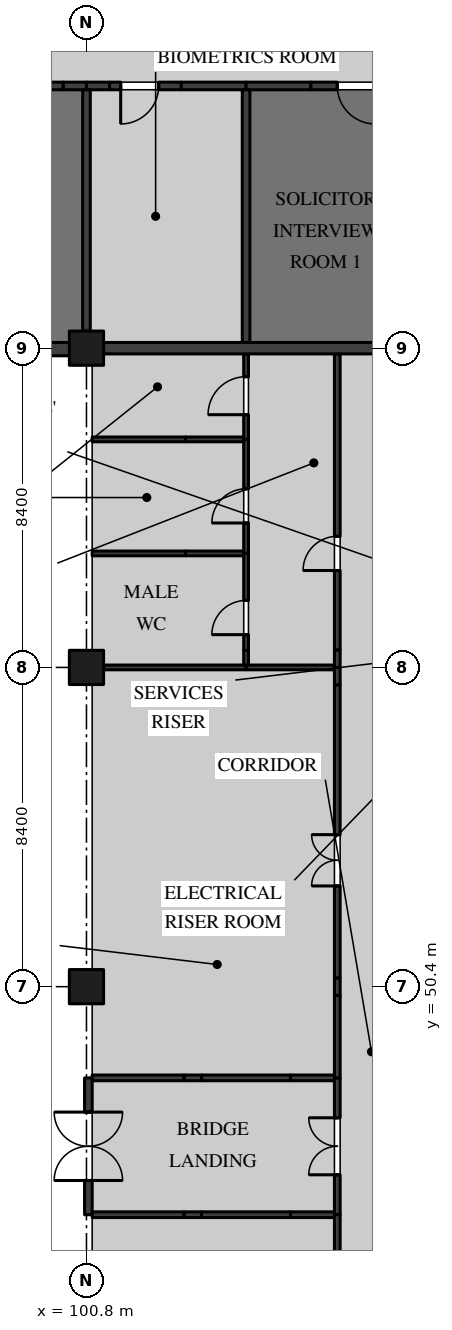
"""IFC4 building model, lengths in metres.
Left out: names, types, materials, properties, quantities, classifications, styles, units other than length and angle.
Written with IfcOpenShell. Run it as: python <this file> out.ifc"""

import sys

from ifc_helpers import new_model, si_unit, direction, frame, frame_2d, origin, origin_2d, place, context, subcontext, project, spatial, rectangle, extrude, element, fill, save


model = new_model("IFC4")
c1 = context("Model", 3, precision=1e-05, world=origin(), true_north=direction((0.0, 1.0)))
c2 = subcontext(c1, "Body", "Model", "MODEL_VIEW")
j1 = project(units=[si_unit("LENGTHUNIT", "METRE"), si_unit("PLANEANGLEUNIT", "RADIAN")], contexts=[c1])
p1 = place(None, origin())
s1 = spatial("IfcSite", under=j1, at=p1, CompositionType="ELEMENT")
p2 = place(p1, origin())
s2 = spatial("IfcBuilding", under=s1, at=p2, CompositionType="ELEMENT")
p3 = place(p2, frame((0.0, 0.0, 5.4)))
s3 = spatial("IfcBuildingStorey", under=s2, at=p3, CompositionType="ELEMENT", Elevation=5.4)
for number, where, z_axis, x_axis in (
    (1, (100.8, 50.4, 0.0), (0.0, 0.0, 1.0), (1.0, 0.0, 0.0)),
    (2, (100.8, 58.8, 0.0), (0.0, 0.0, 1.0), (1.0, 0.0, 0.0)),
    (3, (100.8, 67.2, 0.0), (0.0, 0.0, 1.0), (1.0, 0.0, 0.0)),
):
    element("IfcColumn", number, at=place(p3, frame(where, z_axis=z_axis, x_axis=x_axis)), inside=s3, PredefinedType="COLUMN", context=c2, shape_type="SweptSolid", body=[
        extrude(rectangle(XDim=0.9, YDim=0.9, at=origin_2d()), origin(), (0.0, 0.0, 1.0), 4.37),
    ])
p4 = place(p3, frame((107.4, 44.4, 0.0), z_axis=(0.0, 0.0, 1.0), x_axis=(0.0, 1.0, 0.0)))
e4 = element("IfcWall", 4, at=p4, inside=s3, PredefinedType="PARTITIONING", context=c2, shape_type="SweptSolid", body=[
    extrude(rectangle(XDim=3.6, YDim=0.15, at=frame_2d((1.8, 0.0))), origin(), (0.0, 0.0, 1.0), 4.37),
])
p5 = place(p4, frame((1.05, 0.0, 0.0)))
e5 = element("IfcOpeningElement", 5, at=p5, cuts=e4, PredefinedType="OPENING", context=c2, shape_type="SweptSolid", body=[
    extrude(rectangle(XDim=1.5, YDim=2.1, at=frame_2d((0.75, 1.05))), frame((0.0, 0.085, 0.0), z_axis=(0.0, -1.0, 0.0), x_axis=(1.0, 0.0, 0.0)), (0.0, 0.0, 1.0), 0.17),
])
p6 = place(p3, frame((100.95, 44.4, 0.0), z_axis=(0.0, 0.0, 1.0), x_axis=(1.0, 0.0, 0.0)))
e6 = element("IfcWall", 6, at=p6, inside=s3, PredefinedType="PARTITIONING", context=c2, shape_type="SweptSolid", body=[
    extrude(rectangle(XDim=2.42, YDim=0.15, at=frame_2d((1.21, 0.0))), origin(), (0.0, 0.0, 1.0), 4.37),
])
p7 = place(p3, frame((103.37, 44.4, 0.0), z_axis=(0.0, 0.0, 1.0), x_axis=(1.0, 0.0, 0.0)))
e7 = element("IfcWall", 7, at=p7, inside=s3, PredefinedType="PARTITIONING", context=c2, shape_type="SweptSolid", body=[
    extrude(rectangle(XDim=0.46, YDim=0.15, at=frame_2d((0.23, 0.0))), origin(), (0.0, 0.0, 1.0), 3.895),
])
p8 = place(p3, frame((103.83, 44.4, 0.0), z_axis=(0.0, 0.0, 1.0), x_axis=(1.0, 0.0, 0.0)))
e8 = element("IfcWall", 8, at=p8, inside=s3, PredefinedType="PARTITIONING", context=c2, shape_type="SweptSolid", body=[
    extrude(rectangle(XDim=2.34, YDim=0.15, at=frame_2d((1.17, 0.0))), origin(), (0.0, 0.0, 1.0), 4.37),
])
p9 = place(p3, frame((106.17, 44.4, 0.0), z_axis=(0.0, 0.0, 1.0), x_axis=(1.0, 0.0, 0.0)))
e9 = element("IfcWall", 9, at=p9, inside=s3, PredefinedType="PARTITIONING", context=c2, shape_type="SweptSolid", body=[
    extrude(rectangle(XDim=1.155, YDim=0.15, at=frame_2d((0.578, 0.0))), origin(), (0.0, 0.0, 1.0), 3.895),
])
p10 = place(p3, frame((100.95, 48.0, 0.0), z_axis=(0.0, 0.0, 1.0), x_axis=(1.0, 0.0, 0.0)))
e10 = element("IfcWall", 10, at=p10, inside=s3, PredefinedType="PARTITIONING", context=c2, shape_type="SweptSolid", body=[
    extrude(rectangle(XDim=2.42, YDim=0.15, at=frame_2d((1.21, 0.0))), origin(), (0.0, 0.0, 1.0), 4.37),
])
p11 = place(p3, frame((103.37, 48.0, 0.0), z_axis=(0.0, 0.0, 1.0), x_axis=(1.0, 0.0, 0.0)))
e11 = element("IfcWall", 11, at=p11, inside=s3, PredefinedType="PARTITIONING", context=c2, shape_type="SweptSolid", body=[
    extrude(rectangle(XDim=0.46, YDim=0.15, at=frame_2d((0.23, 0.0))), origin(), (0.0, 0.0, 1.0), 3.895),
])
p12 = place(p3, frame((103.83, 48.0, 0.0), z_axis=(0.0, 0.0, 1.0), x_axis=(1.0, 0.0, 0.0)))
e12 = element("IfcWall", 12, at=p12, inside=s3, PredefinedType="PARTITIONING", context=c2, shape_type="SweptSolid", body=[
    extrude(rectangle(XDim=2.34, YDim=0.15, at=frame_2d((1.17, 0.0))), origin(), (0.0, 0.0, 1.0), 4.37),
])
p13 = place(p3, frame((106.17, 48.0, 0.0), z_axis=(0.0, 0.0, 1.0), x_axis=(1.0, 0.0, 0.0)))
e13 = element("IfcWall", 13, at=p13, inside=s3, PredefinedType="PARTITIONING", context=c2, shape_type="SweptSolid", body=[
    extrude(rectangle(XDim=1.155, YDim=0.15, at=frame_2d((0.578, 0.0))), origin(), (0.0, 0.0, 1.0), 3.895),
])
for number, where, z_axis, x_axis in (
    (14, (107.4, 42.23, 0.0), (0.0, 0.0, 1.0), (0.0, 1.0, 0.0)),
    (15, (107.4, 48.0, 0.0), (0.0, 0.0, 1.0), (0.0, 1.0, 0.0)),
):
    element("IfcWall", number, at=place(p3, frame(where, z_axis=z_axis, x_axis=x_axis)), inside=s3, PredefinedType="PARTITIONING", context=c2, shape_type="SweptSolid", body=[
        extrude(rectangle(XDim=2.17, YDim=0.15, at=frame_2d((1.085, 0.0))), origin(), (0.0, 0.0, 1.0), 4.37),
    ])
p14 = place(p3, frame((107.4, 50.17, 0.0), z_axis=(0.0, 0.0, 1.0), x_axis=(0.0, 1.0, 0.0)))
e16 = element("IfcWall", 16, at=p14, inside=s3, PredefinedType="PARTITIONING", context=c2, shape_type="SweptSolid", body=[
    extrude(rectangle(XDim=0.46, YDim=0.15, at=frame_2d((0.23, 0.0))), origin(), (0.0, 0.0, 1.0), 3.746),
])
p15 = place(p3, frame((107.4, 50.63, 0.0), z_axis=(0.0, 0.0, 1.0), x_axis=(0.0, 1.0, 0.0)))
e17 = element("IfcWall", 17, at=p15, inside=s3, PredefinedType="PARTITIONING", context=c2, shape_type="SweptSolid", body=[
    extrude(rectangle(XDim=7.71, YDim=0.15, at=frame_2d((3.855, 0.0))), origin(), (0.0, 0.0, 1.0), 4.37),
])
p16 = place(p15, frame((2.42, 0.0, 0.0)))
e18 = element("IfcOpeningElement", 18, at=p16, cuts=e17, PredefinedType="OPENING", context=c2, shape_type="SweptSolid", body=[
    extrude(rectangle(XDim=1.35, YDim=2.1, at=frame_2d((0.675, 1.05))), frame((0.0, 0.085, 0.0), z_axis=(0.0, -1.0, 0.0), x_axis=(1.0, 0.0, 0.0)), (0.0, 0.0, 1.0), 0.17),
])
for number, where, z_axis, x_axis in (
    (19, (107.4, 58.34, 0.0), (0.0, 0.0, 1.0), (0.0, 1.0, 0.0)),
    (20, (107.4, 58.8, 0.0), (0.0, 0.0, 1.0), (0.0, 1.0, 0.0)),
):
    element("IfcWall", number, at=place(p3, frame(where, z_axis=z_axis, x_axis=x_axis)), inside=s3, PredefinedType="PARTITIONING", context=c2, shape_type="SweptSolid", body=[
        extrude(rectangle(XDim=0.46, YDim=0.15, at=frame_2d((0.23, 0.0))), origin(), (0.0, 0.0, 1.0), 3.746),
    ])
p17 = place(p3, frame((107.4, 59.26, 0.0), z_axis=(0.0, 0.0, 1.0), x_axis=(0.0, 1.0, 0.0)))
e21 = element("IfcWall", 21, at=p17, inside=s3, PredefinedType="PARTITIONING", context=c2, shape_type="SweptSolid", body=[
    extrude(rectangle(XDim=7.79, YDim=0.15, at=frame_2d((3.895, 0.0))), origin(), (0.0, 0.0, 1.0), 4.37),
])
p18 = place(p17, frame((2.09, 0.0, 0.0)))
e22 = element("IfcOpeningElement", 22, at=p18, cuts=e21, PredefinedType="OPENING", context=c2, shape_type="SweptSolid", body=[
    extrude(rectangle(XDim=0.9, YDim=2.1, at=frame_2d((0.45, 1.05))), frame((0.0, 0.085, 0.0), z_axis=(0.0, -1.0, 0.0), x_axis=(1.0, 0.0, 0.0)), (0.0, 0.0, 1.0), 0.17),
])
p19 = place(p3, frame((105.0, 58.8, 0.0), z_axis=(0.0, 0.0, 1.0), x_axis=(1.0, 0.0, 0.0)))
e23 = element("IfcWall", 23, at=p19, inside=s3, PredefinedType="PARTITIONING", context=c2, shape_type="SweptSolid", body=[
    extrude(rectangle(XDim=2.325, YDim=0.125, at=frame_2d((1.163, 0.0))), origin(), (0.0, 0.0, 1.0), 3.746),
])
p20 = place(p3, frame((101.25, 58.8, 0.0), z_axis=(0.0, 0.0, 1.0), x_axis=(1.0, 0.0, 0.0)))
e24 = element("IfcWall", 24, at=p20, inside=s3, PredefinedType="PARTITIONING", context=c2, shape_type="SweptSolid", body=[
    extrude(rectangle(XDim=3.75, YDim=0.125, at=frame_2d((1.875, 0.0))), origin(), (0.0, 0.0, 1.0), 3.746),
])
p21 = place(p3, frame((100.95, 64.8, 0.0), z_axis=(0.0, 0.0, 1.0), x_axis=(1.0, 0.0, 0.0)))
e25 = element("IfcWall", 25, at=p21, inside=s3, PredefinedType="PARTITIONING", context=c2, shape_type="SweptSolid", body=[
    extrude(rectangle(XDim=2.457, YDim=0.125, at=frame_2d((1.229, 0.0))), origin(), (0.0, 0.0, 1.0), 4.37),
])
p22 = place(p3, frame((103.407, 64.8, 0.0), z_axis=(0.0, 0.0, 1.0), x_axis=(1.0, 0.0, 0.0)))
e26 = element("IfcWall", 26, at=p22, inside=s3, PredefinedType="PARTITIONING", context=c2, shape_type="SweptSolid", body=[
    extrude(rectangle(XDim=1.531, YDim=0.125, at=frame_2d((0.766, 0.0))), origin(), (0.0, 0.0, 1.0), 3.895),
])
p23 = place(p3, frame((105.0, 64.8, 0.0), z_axis=(0.0, 0.0, 1.0), x_axis=(0.0, 1.0, 0.0)))
e27 = element("IfcWall", 27, at=p23, inside=s3, PredefinedType="PARTITIONING", context=c2, shape_type="SweptSolid", body=[
    extrude(rectangle(XDim=2.25, YDim=0.125, at=frame_2d((1.125, 0.0))), origin(), (0.0, 0.0, 1.0), 4.37),
])
p24 = place(p23, frame((0.65, 0.0, 0.0)))
e28 = element("IfcOpeningElement", 28, at=p24, cuts=e27, PredefinedType="OPENING", context=c2, shape_type="SweptSolid", body=[
    extrude(rectangle(XDim=1.0, YDim=2.1, at=frame_2d((0.5, 1.05))), frame((0.0, 0.073, 0.0), z_axis=(0.0, -1.0, 0.0), x_axis=(1.0, 0.0, 0.0)), (0.0, 0.0, 1.0), 0.145),
])
p25 = place(p3, frame((105.0, 61.8, 0.0), z_axis=(0.0, 0.0, 1.0), x_axis=(0.0, 1.0, 0.0)))
e29 = element("IfcWall", 29, at=p25, inside=s3, PredefinedType="PARTITIONING", context=c2, shape_type="SweptSolid", body=[
    extrude(rectangle(XDim=3.0, YDim=0.125, at=frame_2d((1.5, 0.0))), origin(), (0.0, 0.0, 1.0), 4.37),
])
p26 = place(p25, frame((0.8, 0.0, 0.0)))
e30 = element("IfcOpeningElement", 30, at=p26, cuts=e29, PredefinedType="OPENING", context=c2, shape_type="SweptSolid", body=[
    extrude(rectangle(XDim=0.9, YDim=2.1, at=frame_2d((0.45, 1.05))), frame((0.0, 0.073, 0.0), z_axis=(0.0, -1.0, 0.0), x_axis=(1.0, 0.0, 0.0)), (0.0, 0.0, 1.0), 0.145),
])
p27 = place(p3, frame((100.95, 61.8, 0.0), z_axis=(0.0, 0.0, 1.0), x_axis=(1.0, 0.0, 0.0)))
e31 = element("IfcWall", 31, at=p27, inside=s3, PredefinedType="PARTITIONING", context=c2, shape_type="SweptSolid", body=[
    extrude(rectangle(XDim=2.457, YDim=0.125, at=frame_2d((1.229, 0.0))), origin(), (0.0, 0.0, 1.0), 4.37),
])
p28 = place(p3, frame((103.407, 61.8, 0.0), z_axis=(0.0, 0.0, 1.0), x_axis=(1.0, 0.0, 0.0)))
e32 = element("IfcWall", 32, at=p28, inside=s3, PredefinedType="PARTITIONING", context=c2, shape_type="SweptSolid", body=[
    extrude(rectangle(XDim=1.531, YDim=0.125, at=frame_2d((0.766, 0.0))), origin(), (0.0, 0.0, 1.0), 3.895),
])
p29 = place(p3, frame((105.0, 58.862, 0.0), z_axis=(0.0, 0.0, 1.0), x_axis=(0.0, 1.0, 0.0)))
e33 = element("IfcWall", 33, at=p29, inside=s3, PredefinedType="PARTITIONING", context=c2, shape_type="SweptSolid", body=[
    extrude(rectangle(XDim=0.385, YDim=0.125, at=frame_2d((0.192, 0.0))), origin(), (0.0, 0.0, 1.0), 3.746),
])
p30 = place(p3, frame((105.0, 59.247, 0.0), z_axis=(0.0, 0.0, 1.0), x_axis=(0.0, 1.0, 0.0)))
e34 = element("IfcWall", 34, at=p30, inside=s3, PredefinedType="PARTITIONING", context=c2, shape_type="SweptSolid", body=[
    extrude(rectangle(XDim=2.553, YDim=0.125, at=frame_2d((1.276, 0.0))), origin(), (0.0, 0.0, 1.0), 4.37),
])
p31 = place(p30, frame((0.415, 0.0, 0.0)))
e35 = element("IfcOpeningElement", 35, at=p31, cuts=e34, PredefinedType="OPENING", context=c2, shape_type="SweptSolid", body=[
    extrude(rectangle(XDim=0.9, YDim=2.1, at=frame_2d((0.45, 1.05))), frame((0.0, 0.073, 0.0), z_axis=(0.0, -1.0, 0.0), x_axis=(1.0, 0.0, 0.0)), (0.0, 0.0, 1.0), 0.145),
])
p32 = place(p3, frame((98.305, 74.1, 0.0), z_axis=(0.0, 0.0, 1.0), x_axis=(1.0, 0.0, 0.0)))
e36 = element("IfcWall", 36, at=p32, inside=s3, PredefinedType="PARTITIONING", context=c2, shape_type="SweptSolid", body=[
    extrude(rectangle(XDim=1.885, YDim=0.2, at=frame_2d((0.942, 0.0))), origin(), (0.0, 0.0, 1.0), 4.37),
])
p33 = place(p3, frame((100.19, 74.1, 0.0), z_axis=(0.0, 0.0, 1.0), x_axis=(1.0, 0.0, 0.0)))
e37 = element("IfcWall", 37, at=p33, inside=s3, PredefinedType="PARTITIONING", context=c2, shape_type="SweptSolid", body=[
    extrude(rectangle(XDim=0.61, YDim=0.2, at=frame_2d((0.305, 0.0))), origin(), (0.0, 0.0, 1.0), 3.746),
])
p34 = place(p3, frame((100.8, 74.1, 0.0), z_axis=(0.0, 0.0, 1.0), x_axis=(1.0, 0.0, 0.0)))
e38 = element("IfcWall", 38, at=p34, inside=s3, PredefinedType="PARTITIONING", context=c2, shape_type="SweptSolid", body=[
    extrude(rectangle(XDim=0.61, YDim=0.2, at=frame_2d((0.305, 0.0))), origin(), (0.0, 0.0, 1.0), 3.746),
])
p35 = place(p3, frame((101.41, 74.1, 0.0), z_axis=(0.0, 0.0, 1.0), x_axis=(1.0, 0.0, 0.0)))
e39 = element("IfcWall", 39, at=p35, inside=s3, PredefinedType="PARTITIONING", context=c2, shape_type="SweptSolid", body=[
    extrude(rectangle(XDim=1.885, YDim=0.2, at=frame_2d((0.942, 0.0))), origin(), (0.0, 0.0, 1.0), 4.37),
])
p36 = place(p35, frame((0.29, 0.0, 0.0)))
e40 = element("IfcOpeningElement", 40, at=p36, cuts=e39, PredefinedType="OPENING", context=c2, shape_type="SweptSolid", body=[
    extrude(rectangle(XDim=1.0, YDim=2.1, at=frame_2d((0.5, 1.05))), frame((0.0, 0.11, 0.0), z_axis=(0.0, -1.0, 0.0), x_axis=(1.0, 0.0, 0.0)), (0.0, 0.0, 1.0), 0.22),
])
for number, where, z_axis, x_axis in (
    (41, (103.295, 74.1, 0.0), (0.0, 0.0, 1.0), (1.0, 0.0, 0.0)),
    (42, (105.0, 74.1, 0.0), (0.0, 0.0, 1.0), (1.0, 0.0, 0.0)),
):
    element("IfcWall", number, at=place(p3, frame(where, z_axis=z_axis, x_axis=x_axis)), inside=s3, PredefinedType="PARTITIONING", context=c2, shape_type="SweptSolid", body=[
        extrude(rectangle(XDim=1.705, YDim=0.2, at=frame_2d((0.853, 0.0))), origin(), (0.0, 0.0, 1.0), 3.895),
    ])
p37 = place(p3, frame((106.705, 74.1, 0.0), z_axis=(0.0, 0.0, 1.0), x_axis=(1.0, 0.0, 0.0)))
e43 = element("IfcWall", 43, at=p37, inside=s3, PredefinedType="PARTITIONING", context=c2, shape_type="SweptSolid", body=[
    extrude(rectangle(XDim=1.885, YDim=0.2, at=frame_2d((0.942, 0.0))), origin(), (0.0, 0.0, 1.0), 4.37),
])
p38 = place(p37, frame((0.695, 0.0, 0.0)))
e44 = element("IfcOpeningElement", 44, at=p38, cuts=e43, PredefinedType="OPENING", context=c2, shape_type="SweptSolid", body=[
    extrude(rectangle(XDim=1.0, YDim=2.1, at=frame_2d((0.5, 1.05))), frame((0.0, 0.11, 0.0), z_axis=(0.0, -1.0, 0.0), x_axis=(1.0, 0.0, 0.0)), (0.0, 0.0, 1.0), 0.22),
])
p39 = place(p3, frame((100.8, 67.65, 0.0), z_axis=(0.0, 0.0, 1.0), x_axis=(0.0, 1.0, 0.0)))
e45 = element("IfcWall", 45, at=p39, inside=s3, PredefinedType="PARTITIONING", context=c2, shape_type="SweptSolid", body=[
    extrude(rectangle(XDim=6.35, YDim=0.2, at=frame_2d((3.175, 0.0))), origin(), (0.0, 0.0, 1.0), 3.746),
])
p40 = place(p3, frame((105.0, 67.35, 0.0), z_axis=(0.0, 0.0, 1.0), x_axis=(0.0, 1.0, 0.0)))
e46 = element("IfcWall", 46, at=p40, inside=s3, PredefinedType="PARTITIONING", context=c2, shape_type="SweptSolid", body=[
    extrude(rectangle(XDim=6.65, YDim=0.2, at=frame_2d((3.325, 0.0))), origin(), (0.0, 0.0, 1.0), 4.37),
])
p41 = place(p3, frame((92.6, 67.175, 0.0), z_axis=(0.0, 0.0, 1.0), x_axis=(1.0, 0.0, 0.0)))
e47 = element("IfcWall", 47, at=p41, inside=s3, PredefinedType="SOLIDWALL", context=c2, shape_type="SweptSolid", body=[
    extrude(rectangle(XDim=7.77, YDim=0.35, at=frame_2d((3.885, 0.0))), origin(), (0.0, 0.0, 1.0), 3.746),
])
p42 = place(p41, frame((0.7, 0.0, 1.5)))
e48 = element("IfcOpeningElement", 48, at=p42, cuts=e47, PredefinedType="OPENING", context=c2, shape_type="SweptSolid", body=[
    extrude(rectangle(XDim=0.3, YDim=1.5, at=frame_2d((0.15, 0.75))), frame((0.0, 0.185, 0.0), z_axis=(0.0, -1.0, 0.0), x_axis=(1.0, 0.0, 0.0)), (0.0, 0.0, 1.0), 0.37),
])
p43 = place(p41, frame((2.35, 0.0, 1.5)))
e49 = element("IfcOpeningElement", 49, at=p43, cuts=e47, PredefinedType="OPENING", context=c2, shape_type="SweptSolid", body=[
    extrude(rectangle(XDim=1.2, YDim=1.5, at=frame_2d((0.6, 0.75))), frame((0.0, 0.185, 0.0), z_axis=(0.0, -1.0, 0.0), x_axis=(1.0, 0.0, 0.0)), (0.0, 0.0, 1.0), 0.37),
])
p44 = place(p41, frame((4.9, 0.0, 1.5)))
e50 = element("IfcOpeningElement", 50, at=p44, cuts=e47, PredefinedType="OPENING", context=c2, shape_type="SweptSolid", body=[
    extrude(rectangle(XDim=0.3, YDim=1.5, at=frame_2d((0.15, 0.75))), frame((0.0, 0.185, 0.0), z_axis=(0.0, -1.0, 0.0), x_axis=(1.0, 0.0, 0.0)), (0.0, 0.0, 1.0), 0.37),
])
p45 = place(p3, frame((100.85, 48.0, 0.0), z_axis=(0.0, 0.0, 1.0), x_axis=(0.0, -1.0, 0.0)))
e51 = element("IfcWall", 51, at=p45, inside=s3, PredefinedType="SOLIDWALL", context=c2, shape_type="SweptSolid", body=[
    extrude(rectangle(XDim=3.6, YDim=0.2, at=frame_2d((1.8, 0.0))), origin(), (0.0, 0.0, 1.0), 3.746),
])
p46 = place(p45, frame((0.9, 0.0, 0.0)))
e52 = element("IfcOpeningElement", 52, at=p46, cuts=e51, PredefinedType="OPENING", context=c2, shape_type="SweptSolid", body=[
    extrude(rectangle(XDim=1.8, YDim=2.4, at=frame_2d((0.9, 1.2))), frame((0.0, 0.11, 0.0), z_axis=(0.0, -1.0, 0.0), x_axis=(1.0, 0.0, 0.0)), (0.0, 0.0, 1.0), 0.22),
])
p47 = place(p3, frame((109.0, 67.2, 0.0), z_axis=(0.0, 0.0, 1.0), x_axis=(-1.0, 0.0, 0.0)))
e53 = element("IfcWall", 53, at=p47, inside=s3, PredefinedType="SOLIDWALL", context=c2, shape_type="SweptSolid", body=[
    extrude(rectangle(XDim=7.77, YDim=0.3, at=frame_2d((3.885, 0.0))), origin(), (0.0, 0.0, 1.0), 3.746),
])
p48 = place(p5, origin())
e54 = element("IfcDoor", 54, at=p48, inside=s3, OperationType="DOUBLE_DOOR_SINGLE_SWING", PredefinedType="DOOR", context=c2, shape_type="SweptSolid", body=[
    extrude(rectangle(XDim=1.5, YDim=2.1, at=frame_2d((0.75, 1.05))), frame((0.0, 0.025, 0.0), z_axis=(0.0, -1.0, 0.0), x_axis=(1.0, 0.0, 0.0)), (0.0, 0.0, 1.0), 0.05),
])
fill(e5, e54)
p49 = place(p16, origin())
e55 = element("IfcDoor", 55, at=p49, inside=s3, OperationType="DOUBLE_DOOR_SINGLE_SWING", PredefinedType="DOOR", context=c2, shape_type="SweptSolid", body=[
    extrude(rectangle(XDim=1.35, YDim=2.1, at=frame_2d((0.675, 1.05))), frame((0.0, 0.025, 0.0), z_axis=(0.0, -1.0, 0.0), x_axis=(1.0, 0.0, 0.0)), (0.0, 0.0, 1.0), 0.05),
])
fill(e18, e55)
p50 = place(p24, origin())
e56 = element("IfcDoor", 56, at=p50, inside=s3, OperationType="SINGLE_SWING_RIGHT", PredefinedType="DOOR", context=c2, shape_type="SweptSolid", body=[
    extrude(rectangle(XDim=1.0, YDim=2.1, at=frame_2d((0.5, 1.05))), frame((0.0, 0.02, 0.0), z_axis=(0.0, -1.0, 0.0), x_axis=(1.0, 0.0, 0.0)), (0.0, 0.0, 1.0), 0.04),
])
fill(e28, e56)
p51 = place(p26, origin())
e57 = element("IfcDoor", 57, at=p51, inside=s3, OperationType="SINGLE_SWING_RIGHT", PredefinedType="DOOR", context=c2, shape_type="SweptSolid", body=[
    extrude(rectangle(XDim=0.9, YDim=2.1, at=frame_2d((0.45, 1.05))), frame((0.0, 0.02, 0.0), z_axis=(0.0, -1.0, 0.0), x_axis=(1.0, 0.0, 0.0)), (0.0, 0.0, 1.0), 0.04),
])
fill(e30, e57)
p52 = place(p18, origin())
e58 = element("IfcDoor", 58, at=p52, inside=s3, OperationType="SINGLE_SWING_RIGHT", PredefinedType="DOOR", context=c2, shape_type="SweptSolid", body=[
    extrude(rectangle(XDim=0.9, YDim=2.1, at=frame_2d((0.45, 1.05))), frame((0.0, 0.025, 0.0), z_axis=(0.0, -1.0, 0.0), x_axis=(1.0, 0.0, 0.0)), (0.0, 0.0, 1.0), 0.05),
])
fill(e22, e58)
p53 = place(p31, origin())
e59 = element("IfcDoor", 59, at=p53, inside=s3, OperationType="SINGLE_SWING_RIGHT", PredefinedType="DOOR", context=c2, shape_type="SweptSolid", body=[
    extrude(rectangle(XDim=0.9, YDim=2.1, at=frame_2d((0.45, 1.05))), frame((0.0, 0.02, 0.0), z_axis=(0.0, -1.0, 0.0), x_axis=(1.0, 0.0, 0.0)), (0.0, 0.0, 1.0), 0.04),
])
fill(e35, e59)
p54 = place(p36, frame((1.0, 0.0, 0.0), z_axis=(0.0, 0.0, 1.0), x_axis=(-1.0, 0.0, 0.0)))
e60 = element("IfcDoor", 60, at=p54, inside=s3, OperationType="SINGLE_SWING_LEFT", PredefinedType="DOOR", context=c2, shape_type="SweptSolid", body=[
    extrude(rectangle(XDim=1.0, YDim=2.1, at=frame_2d((0.5, 1.05))), frame((0.0, 0.045, 0.0), z_axis=(0.0, -1.0, 0.0), x_axis=(1.0, 0.0, 0.0)), (0.0, 0.0, 1.0), 0.09),
])
fill(e40, e60)
p55 = place(p38, frame((1.0, 0.0, 0.0), z_axis=(0.0, 0.0, 1.0), x_axis=(-1.0, 0.0, 0.0)))
e61 = element("IfcDoor", 61, at=p55, inside=s3, OperationType="SINGLE_SWING_RIGHT", PredefinedType="DOOR", context=c2, shape_type="SweptSolid", body=[
    extrude(rectangle(XDim=1.0, YDim=2.1, at=frame_2d((0.5, 1.05))), frame((0.0, 0.045, 0.0), z_axis=(0.0, -1.0, 0.0), x_axis=(1.0, 0.0, 0.0)), (0.0, 0.0, 1.0), 0.09),
])
fill(e44, e61)
p56 = place(p46, frame((1.8, 0.0, 0.0), z_axis=(0.0, 0.0, 1.0), x_axis=(-1.0, 0.0, 0.0)))
e62 = element("IfcDoor", 62, at=p56, inside=s3, OperationType="DOUBLE_DOOR_DOUBLE_SWING", PredefinedType="DOOR", context=c2, shape_type="SweptSolid", body=[
    extrude(rectangle(XDim=1.8, YDim=2.4, at=frame_2d((0.9, 1.2))), frame((0.0, 0.025, 0.0), z_axis=(0.0, -1.0, 0.0), x_axis=(1.0, 0.0, 0.0)), (0.0, 0.0, 1.0), 0.05),
])
fill(e52, e62)
save(model, sys.argv[1])
